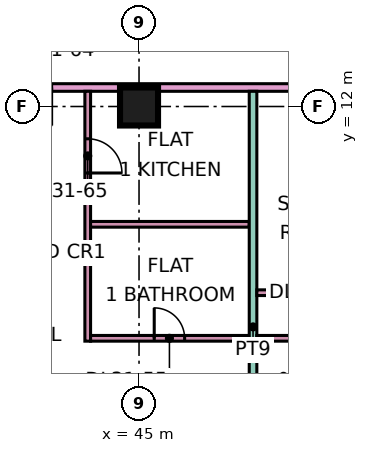
"""IFC4 building model, lengths in metres.
Left out: names, types, materials, properties, quantities, classifications, styles, units other than length and angle.
Written with IfcOpenShell. Run it as: python <this file> out.ifc"""

import sys

from ifc_helpers import new_model, si_unit, direction, frame, frame_2d, origin, origin_2d, place, context, subcontext, project, spatial, rectangle, extrude, element, fill, save


model = new_model("IFC4")
c1 = context("Model", 3, precision=1e-05, world=origin(), true_north=direction((0.0, 1.0)))
c2 = subcontext(c1, "Body", "Model", "MODEL_VIEW")
j1 = project(units=[si_unit("LENGTHUNIT", "METRE"), si_unit("PLANEANGLEUNIT", "RADIAN")], contexts=[c1])
p1 = place(None, origin())
s1 = spatial("IfcSite", under=j1, at=p1, CompositionType="ELEMENT")
p2 = place(p1, origin())
s2 = spatial("IfcBuilding", under=s1, at=p2, CompositionType="ELEMENT")
p3 = place(p2, frame((0.0, 0.0, 133.15)))
s3 = spatial("IfcBuildingStorey", under=s2, at=p3, CompositionType="ELEMENT", Elevation=133.15)
p4 = place(p3, frame((45.0, 12.0, 0.0), z_axis=(0.0, 0.0, 1.0), x_axis=(1.0, 0.0, 0.0)))
e1 = element("IfcColumn", 1, at=p4, inside=s3, PredefinedType="COLUMN", context=c2, shape_type="SweptSolid", body=[
    extrude(rectangle(XDim=1.0, YDim=1.0, at=origin_2d()), origin(), (0.0, 0.0, 1.0), 3.75),
])
p5 = place(p3, frame((40.65, 12.5, 0.0), z_axis=(0.0, 0.0, 1.0), x_axis=(1.0, 0.0, 0.0)))
e2 = element("IfcWall", 2, at=p5, inside=s3, PredefinedType="PARTITIONING", context=c2, shape_type="SweptSolid", body=[
    extrude(rectangle(XDim=31.276, YDim=0.2, at=frame_2d((15.638, 0.0))), origin(), (0.0, 0.0, 1.0), 3.35),
])
p6 = place(p5, frame((29.1, 0.0, 0.0)))
e3 = element("IfcOpeningElement", 3, at=p6, cuts=e2, PredefinedType="OPENING", context=c2, shape_type="SweptSolid", body=[
    extrude(rectangle(XDim=1.0, YDim=2.1, at=frame_2d((0.5, 1.05))), frame((0.0, 0.11, 0.0), z_axis=(0.0, -1.0, 0.0), x_axis=(1.0, 0.0, 0.0)), (0.0, 0.0, 1.0), 0.22),
])
p7 = place(p5, frame((1.05, 0.0, 0.0)))
e4 = element("IfcOpeningElement", 4, at=p7, cuts=e2, PredefinedType="OPENING", context=c2, shape_type="SweptSolid", body=[
    extrude(rectangle(XDim=1.0, YDim=2.1, at=frame_2d((0.5, 1.05))), frame((0.0, 0.11, 0.0), z_axis=(0.0, -1.0, 0.0), x_axis=(1.0, 0.0, 0.0)), (0.0, 0.0, 1.0), 0.22),
])
p8 = place(p3, frame((43.65, 5.825, 0.0), z_axis=(0.0, 0.0, 1.0), x_axis=(0.0, 1.0, 0.0)))
e5 = element("IfcWall", 5, at=p8, inside=s3, PredefinedType="PARTITIONING", context=c2, shape_type="SweptSolid", body=[
    extrude(rectangle(XDim=6.575, YDim=0.15, at=frame_2d((3.288, 0.0))), origin(), (0.0, 0.0, 1.0), 3.35),
])
p9 = place(p8, frame((4.425, 0.0, 0.0)))
e6 = element("IfcOpeningElement", 6, at=p9, cuts=e5, PredefinedType="OPENING", context=c2, shape_type="SweptSolid", body=[
    extrude(rectangle(XDim=0.9, YDim=2.1, at=frame_2d((0.45, 1.05))), frame((0.0, 0.085, 0.0), z_axis=(0.0, -1.0, 0.0), x_axis=(1.0, 0.0, 0.0)), (0.0, 0.0, 1.0), 0.17),
])
p10 = place(p3, frame((43.725, 5.9, 0.0), z_axis=(0.0, 0.0, 1.0), x_axis=(1.0, 0.0, 0.0)))
e7 = element("IfcWall", 7, at=p10, inside=s3, PredefinedType="PARTITIONING", context=c2, shape_type="SweptSolid", body=[
    extrude(rectangle(XDim=4.175, YDim=0.15, at=frame_2d((2.087, 0.0))), origin(), (0.0, 0.0, 1.0), 3.35),
])
p11 = place(p10, frame((1.675, 0.0, 0.0)))
e8 = element("IfcOpeningElement", 8, at=p11, cuts=e7, PredefinedType="OPENING", context=c2, shape_type="SweptSolid", body=[
    extrude(rectangle(XDim=0.8, YDim=2.1, at=frame_2d((0.4, 1.05))), frame((0.0, 0.085, 0.0), z_axis=(0.0, -1.0, 0.0), x_axis=(1.0, 0.0, 0.0)), (0.0, 0.0, 1.0), 0.17),
])
p12 = place(p3, frame((43.725, 8.9, 0.0), z_axis=(0.0, 0.0, 1.0), x_axis=(1.0, 0.0, 0.0)))
e9 = element("IfcWall", 9, at=p12, inside=s3, PredefinedType="PARTITIONING", context=c2, shape_type="SweptSolid", body=[
    extrude(rectangle(XDim=4.175, YDim=0.15, at=frame_2d((2.087, 0.0))), origin(), (0.0, 0.0, 1.0), 3.35),
])
p13 = place(p3, frame((48.0, 0.0, 0.0), z_axis=(0.0, 0.0, 1.0), x_axis=(0.0, 1.0, 0.0)))
e10 = element("IfcWall", 10, at=p13, inside=s3, PredefinedType="PARTITIONING", context=c2, shape_type="SweptSolid", body=[
    extrude(rectangle(XDim=12.4, YDim=0.2, at=frame_2d((6.2, 0.0))), origin(), (0.0, 0.0, 1.0), 3.35),
])
p14 = place(p3, frame((48.1, 5.9, 0.0), z_axis=(0.0, 0.0, 1.0), x_axis=(1.0, 0.0, 0.0)))
e11 = element("IfcWall", 11, at=p14, inside=s3, PredefinedType="PARTITIONING", context=c2, shape_type="SweptSolid", body=[
    extrude(rectangle(XDim=25.25, YDim=0.15, at=frame_2d((12.625, 0.0))), origin(), (0.0, 0.0, 1.0), 3.35),
])
p15 = place(p14, frame((6.95, 0.0, 0.0)))
e12 = element("IfcOpeningElement", 12, at=p15, cuts=e11, PredefinedType="OPENING", context=c2, shape_type="SweptSolid", body=[
    extrude(rectangle(XDim=0.9, YDim=2.1, at=frame_2d((0.45, 1.05))), frame((0.0, 0.085, 0.0), z_axis=(0.0, -1.0, 0.0), x_axis=(1.0, 0.0, 0.0)), (0.0, 0.0, 1.0), 0.17),
])
p16 = place(p14, frame((9.95, 0.0, 0.0)))
e13 = element("IfcOpeningElement", 13, at=p16, cuts=e11, PredefinedType="OPENING", context=c2, shape_type="SweptSolid", body=[
    extrude(rectangle(XDim=0.9, YDim=2.1, at=frame_2d((0.45, 1.05))), frame((0.0, 0.085, 0.0), z_axis=(0.0, -1.0, 0.0), x_axis=(1.0, 0.0, 0.0)), (0.0, 0.0, 1.0), 0.17),
])
p17 = place(p14, frame((15.95, 0.0, 0.0)))
e14 = element("IfcOpeningElement", 14, at=p17, cuts=e11, PredefinedType="OPENING", context=c2, shape_type="SweptSolid", body=[
    extrude(rectangle(XDim=0.9, YDim=2.1, at=frame_2d((0.45, 1.05))), frame((0.0, 0.085, 0.0), z_axis=(0.0, -1.0, 0.0), x_axis=(1.0, 0.0, 0.0)), (0.0, 0.0, 1.0), 0.17),
])
p18 = place(p14, frame((20.45, 0.0, 0.0)))
e15 = element("IfcOpeningElement", 15, at=p18, cuts=e11, PredefinedType="OPENING", context=c2, shape_type="SweptSolid", body=[
    extrude(rectangle(XDim=0.9, YDim=2.1, at=frame_2d((0.45, 1.05))), frame((0.0, 0.085, 0.0), z_axis=(0.0, -1.0, 0.0), x_axis=(1.0, 0.0, 0.0)), (0.0, 0.0, 1.0), 0.17),
])
p19 = place(p14, frame((1.8, 0.0, 0.0)))
e16 = element("IfcOpeningElement", 16, at=p19, cuts=e11, PredefinedType="OPENING", context=c2, shape_type="SweptSolid", body=[
    extrude(rectangle(XDim=0.8, YDim=2.1, at=frame_2d((0.4, 1.05))), frame((0.0, 0.085, 0.0), z_axis=(0.0, -1.0, 0.0), x_axis=(1.0, 0.0, 0.0)), (0.0, 0.0, 1.0), 0.17),
])
p20 = place(p14, frame((3.65, 0.0, 0.0)))
e17 = element("IfcOpeningElement", 17, at=p20, cuts=e11, PredefinedType="OPENING", context=c2, shape_type="SweptSolid", body=[
    extrude(rectangle(XDim=1.6, YDim=2.1, at=frame_2d((0.8, 1.05))), frame((0.0, 0.085, 0.0), z_axis=(0.0, -1.0, 0.0), x_axis=(1.0, 0.0, 0.0)), (0.0, 0.0, 1.0), 0.17),
])
p21 = place(p3, frame((48.1, 7.1, 0.0), z_axis=(0.0, 0.0, 1.0), x_axis=(1.0, 0.0, 0.0)))
e18 = element("IfcWall", 18, at=p21, inside=s3, PredefinedType="PARTITIONING", context=c2, shape_type="SweptSolid", body=[
    extrude(rectangle(XDim=20.35, YDim=0.15, at=frame_2d((10.175, 0.0))), origin(), (0.0, 0.0, 1.0), 3.35),
])
p22 = place(p21, frame((16.05, 0.0, 0.0)))
e19 = element("IfcOpeningElement", 19, at=p22, cuts=e18, PredefinedType="OPENING", context=c2, shape_type="SweptSolid", body=[
    extrude(rectangle(XDim=0.8, YDim=2.1, at=frame_2d((0.4, 1.05))), frame((0.0, 0.085, 0.0), z_axis=(0.0, -1.0, 0.0), x_axis=(1.0, 0.0, 0.0)), (0.0, 0.0, 1.0), 0.17),
])
p23 = place(p21, frame((11.6, 0.0, 0.0)))
e20 = element("IfcOpeningElement", 20, at=p23, cuts=e18, PredefinedType="OPENING", context=c2, shape_type="SweptSolid", body=[
    extrude(rectangle(XDim=0.9, YDim=2.1, at=frame_2d((0.45, 1.05))), frame((0.0, 0.085, 0.0), z_axis=(0.0, -1.0, 0.0), x_axis=(1.0, 0.0, 0.0)), (0.0, 0.0, 1.0), 0.17),
])
p24 = place(p21, frame((3.9, 0.0, 0.0)))
e21 = element("IfcOpeningElement", 21, at=p24, cuts=e18, PredefinedType="OPENING", context=c2, shape_type="SweptSolid", body=[
    extrude(rectangle(XDim=0.8, YDim=2.1, at=frame_2d((0.4, 1.05))), frame((0.0, 0.085, 0.0), z_axis=(0.0, -1.0, 0.0), x_axis=(1.0, 0.0, 0.0)), (0.0, 0.0, 1.0), 0.17),
])
p25 = place(p21, frame((0.95, 0.0, 0.0)))
e22 = element("IfcOpeningElement", 22, at=p25, cuts=e18, PredefinedType="OPENING", context=c2, shape_type="SweptSolid", body=[
    extrude(rectangle(XDim=0.9, YDim=2.1, at=frame_2d((0.45, 1.05))), frame((0.0, 0.085, 0.0), z_axis=(0.0, -1.0, 0.0), x_axis=(1.0, 0.0, 0.0)), (0.0, 0.0, 1.0), 0.17),
])
p26 = place(p21, frame((7.05, 0.0, 0.0)))
e23 = element("IfcOpeningElement", 23, at=p26, cuts=e18, PredefinedType="OPENING", context=c2, shape_type="SweptSolid", body=[
    extrude(rectangle(XDim=0.8, YDim=2.1, at=frame_2d((0.4, 1.05))), frame((0.0, 0.085, 0.0), z_axis=(0.0, -1.0, 0.0), x_axis=(1.0, 0.0, 0.0)), (0.0, 0.0, 1.0), 0.17),
])
p27 = place(p11, origin())
e24 = element("IfcDoor", 24, at=p27, inside=s3, OperationType="SINGLE_SWING_LEFT", PredefinedType="DOOR", context=c2, shape_type="SweptSolid", body=[
    extrude(rectangle(XDim=0.8, YDim=2.1, at=frame_2d((0.4, 1.05))), frame((0.0, 0.025, 0.0), z_axis=(0.0, -1.0, 0.0), x_axis=(1.0, 0.0, 0.0)), (0.0, 0.0, 1.0), 0.05),
])
fill(e8, e24)
p28 = place(p9, frame((0.9, 0.0, 0.0), z_axis=(0.0, 0.0, 1.0), x_axis=(-1.0, 0.0, 0.0)))
e25 = element("IfcDoor", 25, at=p28, inside=s3, OperationType="SINGLE_SWING_LEFT", PredefinedType="DOOR", context=c2, shape_type="SweptSolid", body=[
    extrude(rectangle(XDim=0.9, YDim=2.1, at=frame_2d((0.45, 1.05))), frame((0.0, 0.025, 0.0), z_axis=(0.0, -1.0, 0.0), x_axis=(1.0, 0.0, 0.0)), (0.0, 0.0, 1.0), 0.05),
])
fill(e6, e25)
save(model, sys.argv[1])
